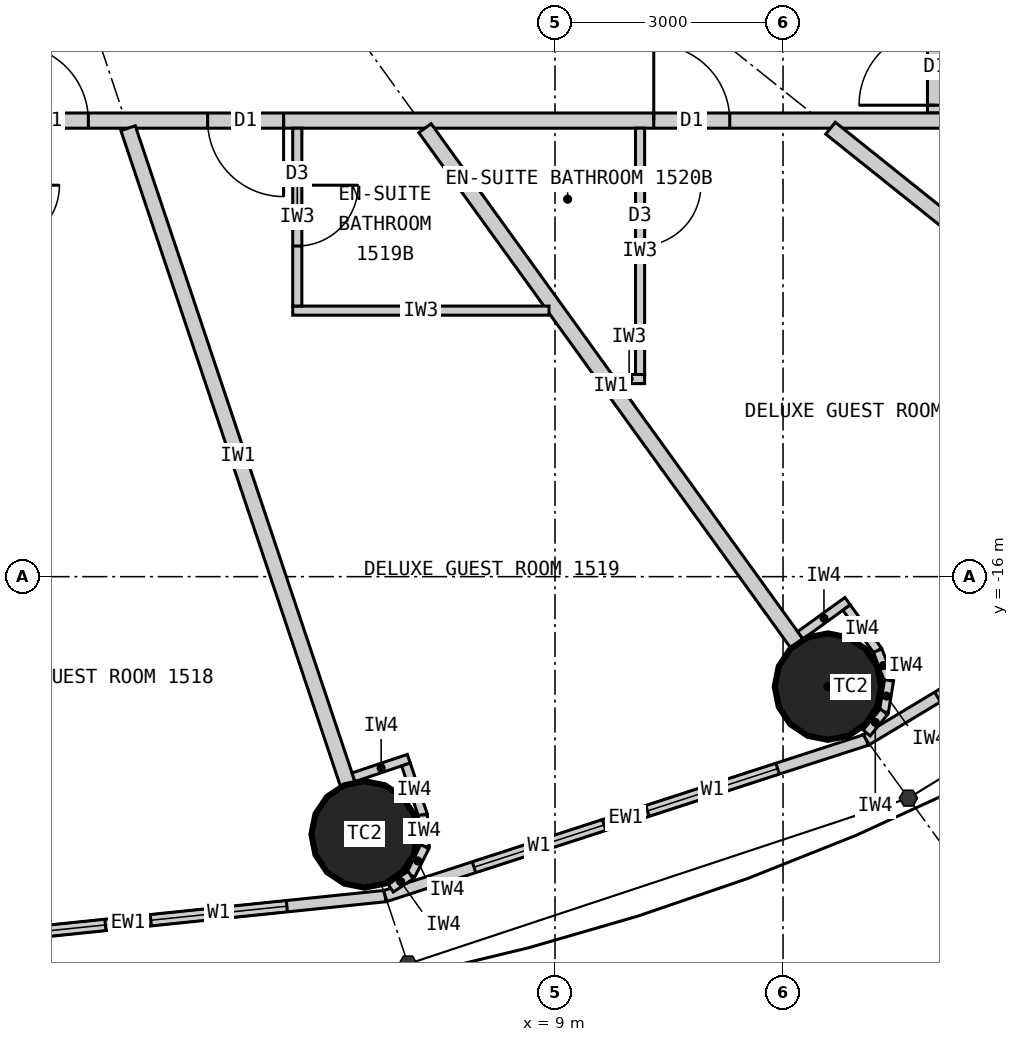
"""IFC4 building model, lengths in metres.
Left out: names, types, materials, properties, quantities, classifications, styles, units other than length and angle.
Written with IfcOpenShell. Run it as: python <this file> out.ifc"""

import sys

from ifc_helpers import new_model, si_unit, direction, frame, frame_2d, origin, origin_2d, place, context, subcontext, project, spatial, rectangle, circle, extrude, element, fill, save


model = new_model("IFC4")
c1 = context("Model", 3, precision=1e-05, world=origin(), true_north=direction((0.0, 1.0)))
c2 = subcontext(c1, "Body", "Model", "MODEL_VIEW")
j1 = project(units=[si_unit("LENGTHUNIT", "METRE"), si_unit("PLANEANGLEUNIT", "RADIAN")], contexts=[c1])
p1 = place(None, origin())
s1 = spatial("IfcSite", under=j1, at=p1, CompositionType="ELEMENT")
p2 = place(p1, origin())
s2 = spatial("IfcBuilding", under=s1, at=p2, CompositionType="ELEMENT")
p3 = place(p2, frame((0.0, 0.0, 63.9)))
s3 = spatial("IfcBuildingStorey", under=s2, at=p3, CompositionType="ELEMENT", Elevation=63.9)
for number, where, z_axis, x_axis in (
    (1, (6.495, -19.391, 0.0), (0.0, 0.0, 1.0), (1.0, 0.0, 0.0)),
    (2, (12.591, -17.447, 0.0), (0.0, 0.0, 1.0), (1.0, 0.0, 0.0)),
):
    element("IfcColumn", number, at=place(p3, frame(where, z_axis=z_axis, x_axis=x_axis)), inside=s3, PredefinedType="COLUMN", context=c2, shape_type="SweptSolid", body=[
        extrude(circle(Radius=0.7, at=origin_2d()), origin(), (0.0, 0.0, 1.0), 3.3),
    ])
p4 = place(p3, frame((0.0, -20.9, 0.0), z_axis=(0.0, 0.0, 1.0), x_axis=(0.994721394369, 0.102612609291, 0.0)))
e3 = element("IfcWall", 3, at=p4, inside=s3, PredefinedType="ELEMENTEDWALL", context=c2, shape_type="SweptSolid", body=[
    extrude(rectangle(XDim=6.802, YDim=0.15, at=frame_2d((3.401, 0.0))), origin(), (0.0, 0.0, 1.0), 3.12),
])
p5 = place(p4, frame((1.301, 0.0, 0.9)))
e4 = element("IfcOpeningElement", 4, at=p5, cuts=e3, PredefinedType="OPENING", context=c2, shape_type="SweptSolid", body=[
    extrude(rectangle(XDim=1.8, YDim=1.9, at=frame_2d((0.9, 0.95))), frame((0.0, 0.085, 0.0), z_axis=(0.0, -1.0, 0.0), x_axis=(1.0, 0.0, 0.0)), (0.0, 0.0, 1.0), 0.17),
])
p6 = place(p4, frame((3.701, 0.0, 0.9)))
e5 = element("IfcOpeningElement", 5, at=p6, cuts=e3, PredefinedType="OPENING", context=c2, shape_type="SweptSolid", body=[
    extrude(rectangle(XDim=1.8, YDim=1.9, at=frame_2d((0.9, 0.95))), frame((0.0, 0.085, 0.0), z_axis=(0.0, -1.0, 0.0), x_axis=(1.0, 0.0, 0.0)), (0.0, 0.0, 1.0), 0.17),
])
p7 = place(p3, frame((6.766, -20.202, 0.0), z_axis=(0.0, 0.0, 1.0), x_axis=(0.951137534625, 0.308767534285, 0.0)))
e6 = element("IfcWall", 6, at=p7, inside=s3, PredefinedType="ELEMENTEDWALL", context=c2, shape_type="SweptSolid", body=[
    extrude(rectangle(XDim=6.655, YDim=0.15, at=frame_2d((3.328, 0.0))), origin(), (0.0, 0.0, 1.0), 3.12),
])
p8 = place(p7, frame((1.228, 0.0, 0.9)))
e7 = element("IfcOpeningElement", 7, at=p8, cuts=e6, PredefinedType="OPENING", context=c2, shape_type="SweptSolid", body=[
    extrude(rectangle(XDim=1.8, YDim=1.9, at=frame_2d((0.9, 0.95))), frame((0.0, 0.085, 0.0), z_axis=(0.0, -1.0, 0.0), x_axis=(1.0, 0.0, 0.0)), (0.0, 0.0, 1.0), 0.17),
])
p9 = place(p7, frame((3.628, 0.0, 0.9)))
e8 = element("IfcOpeningElement", 8, at=p9, cuts=e6, PredefinedType="OPENING", context=c2, shape_type="SweptSolid", body=[
    extrude(rectangle(XDim=1.8, YDim=1.9, at=frame_2d((0.9, 0.95))), frame((0.0, 0.085, 0.0), z_axis=(0.0, -1.0, 0.0), x_axis=(1.0, 0.0, 0.0)), (0.0, 0.0, 1.0), 0.17),
])
p10 = place(p3, frame((13.096, -18.147, 0.0), z_axis=(0.0, 0.0, 1.0), x_axis=(0.856983180864, 0.515344377787, 0.0)))
e9 = element("IfcWall", 9, at=p10, inside=s3, PredefinedType="ELEMENTEDWALL", context=c2, shape_type="SweptSolid", body=[
    extrude(rectangle(XDim=6.386, YDim=0.15, at=frame_2d((3.193, 0.0))), origin(), (0.0, 0.0, 1.0), 3.12),
])
p11 = place(p10, frame((1.093, 0.0, 0.9)))
e10 = element("IfcOpeningElement", 10, at=p11, cuts=e9, PredefinedType="OPENING", context=c2, shape_type="SweptSolid", body=[
    extrude(rectangle(XDim=1.8, YDim=1.9, at=frame_2d((0.9, 0.95))), frame((0.0, 0.085, 0.0), z_axis=(0.0, -1.0, 0.0), x_axis=(1.0, 0.0, 0.0)), (0.0, 0.0, 1.0), 0.17),
])
p12 = place(p10, frame((3.493, 0.0, 0.9)))
e11 = element("IfcOpeningElement", 11, at=p12, cuts=e9, PredefinedType="OPENING", context=c2, shape_type="SweptSolid", body=[
    extrude(rectangle(XDim=1.8, YDim=1.9, at=frame_2d((0.9, 0.95))), frame((0.0, 0.085, 0.0), z_axis=(0.0, -1.0, 0.0), x_axis=(1.0, 0.0, 0.0)), (0.0, 0.0, 1.0), 0.17),
])
p13 = place(p3, frame((14.0, -9.9, 0.0), z_axis=(0.0, 0.0, 1.0), x_axis=(0.0, 1.0, 0.0)))
e12 = element("IfcWall", 12, at=p13, inside=s3, PredefinedType="PARTITIONING", context=c2, shape_type="SweptSolid", body=[
    extrude(rectangle(XDim=19.8, YDim=0.2, at=frame_2d((9.9, 0.0))), origin(), (0.0, 0.0, 1.0), 3.12),
])
p14 = place(p13, frame((0.103, 0.0, 0.0)))
e13 = element("IfcOpeningElement", 13, at=p14, cuts=e12, PredefinedType="OPENING", context=c2, shape_type="SweptSolid", body=[
    extrude(rectangle(XDim=1.0, YDim=2.2, at=frame_2d((0.5, 1.1))), frame((0.0, 0.11, 0.0), z_axis=(0.0, -1.0, 0.0), x_axis=(1.0, 0.0, 0.0)), (0.0, 0.0, 1.0), 0.22),
])
p15 = place(p13, frame((5.248, 0.0, 0.0)))
e14 = element("IfcOpeningElement", 14, at=p15, cuts=e12, PredefinedType="OPENING", context=c2, shape_type="SweptSolid", body=[
    extrude(rectangle(XDim=1.0, YDim=2.2, at=frame_2d((0.5, 1.1))), frame((0.0, 0.11, 0.0), z_axis=(0.0, -1.0, 0.0), x_axis=(1.0, 0.0, 0.0)), (0.0, 0.0, 1.0), 0.22),
])
p16 = place(p13, frame((8.438, 0.0, 0.0)))
e15 = element("IfcOpeningElement", 15, at=p16, cuts=e12, PredefinedType="OPENING", context=c2, shape_type="SweptSolid", body=[
    extrude(rectangle(XDim=1.0, YDim=2.2, at=frame_2d((0.5, 1.1))), frame((0.0, 0.11, 0.0), z_axis=(0.0, -1.0, 0.0), x_axis=(1.0, 0.0, 0.0)), (0.0, 0.0, 1.0), 0.22),
])
p17 = place(p13, frame((14.532, 0.0, 0.0)))
e16 = element("IfcOpeningElement", 16, at=p17, cuts=e12, PredefinedType="OPENING", context=c2, shape_type="SweptSolid", body=[
    extrude(rectangle(XDim=1.0, YDim=2.2, at=frame_2d((0.5, 1.1))), frame((0.0, 0.11, 0.0), z_axis=(0.0, -1.0, 0.0), x_axis=(1.0, 0.0, 0.0)), (0.0, 0.0, 1.0), 0.22),
])
p18 = place(p3, frame((14.1, -10.0, 0.0), z_axis=(0.0, 0.0, 1.0), x_axis=(-1.0, 0.0, 0.0)))
e17 = element("IfcWall", 17, at=p18, inside=s3, PredefinedType="PARTITIONING", context=c2, shape_type="SweptSolid", body=[
    extrude(rectangle(XDim=28.2, YDim=0.2, at=frame_2d((14.1, 0.0))), origin(), (0.0, 0.0, 1.0), 3.12),
])
p19 = place(p18, frame((23.865, 0.0, 0.0)))
e18 = element("IfcOpeningElement", 18, at=p19, cuts=e17, PredefinedType="OPENING", context=c2, shape_type="SweptSolid", body=[
    extrude(rectangle(XDim=1.0, YDim=2.2, at=frame_2d((0.5, 1.1))), frame((0.0, 0.11, 0.0), z_axis=(0.0, -1.0, 0.0), x_axis=(1.0, 0.0, 0.0)), (0.0, 0.0, 1.0), 0.22),
])
p20 = place(p18, frame((18.529, 0.0, 0.0)))
e19 = element("IfcOpeningElement", 19, at=p20, cuts=e17, PredefinedType="OPENING", context=c2, shape_type="SweptSolid", body=[
    extrude(rectangle(XDim=1.0, YDim=2.2, at=frame_2d((0.5, 1.1))), frame((0.0, 0.11, 0.0), z_axis=(0.0, -1.0, 0.0), x_axis=(1.0, 0.0, 0.0)), (0.0, 0.0, 1.0), 0.22),
])
p21 = place(p18, frame((14.623, 0.0, 0.0)))
e20 = element("IfcOpeningElement", 20, at=p21, cuts=e17, PredefinedType="OPENING", context=c2, shape_type="SweptSolid", body=[
    extrude(rectangle(XDim=1.0, YDim=2.2, at=frame_2d((0.5, 1.1))), frame((0.0, 0.11, 0.0), z_axis=(0.0, -1.0, 0.0), x_axis=(1.0, 0.0, 0.0)), (0.0, 0.0, 1.0), 0.22),
])
p22 = place(p18, frame((11.24, 0.0, 0.0)))
e21 = element("IfcOpeningElement", 21, at=p22, cuts=e17, PredefinedType="OPENING", context=c2, shape_type="SweptSolid", body=[
    extrude(rectangle(XDim=1.0, YDim=2.2, at=frame_2d((0.5, 1.1))), frame((0.0, 0.11, 0.0), z_axis=(0.0, -1.0, 0.0), x_axis=(1.0, 0.0, 0.0)), (0.0, 0.0, 1.0), 0.22),
])
p23 = place(p18, frame((8.671, 0.0, 0.0)))
e22 = element("IfcOpeningElement", 22, at=p23, cuts=e17, PredefinedType="OPENING", context=c2, shape_type="SweptSolid", body=[
    extrude(rectangle(XDim=1.0, YDim=2.2, at=frame_2d((0.5, 1.1))), frame((0.0, 0.11, 0.0), z_axis=(0.0, -1.0, 0.0), x_axis=(1.0, 0.0, 0.0)), (0.0, 0.0, 1.0), 0.22),
])
p24 = place(p18, frame((2.801, 0.0, 0.0)))
e23 = element("IfcOpeningElement", 23, at=p24, cuts=e17, PredefinedType="OPENING", context=c2, shape_type="SweptSolid", body=[
    extrude(rectangle(XDim=1.0, YDim=2.2, at=frame_2d((0.5, 1.1))), frame((0.0, 0.11, 0.0), z_axis=(0.0, -1.0, 0.0), x_axis=(1.0, 0.0, 0.0)), (0.0, 0.0, 1.0), 0.22),
])
p25 = place(p3, frame((3.383, -10.1, 0.0), z_axis=(0.0, 0.0, 1.0), x_axis=(0.31759592231, -0.948226149256, 0.0)))
e24 = element("IfcWall", 24, at=p25, inside=s3, PredefinedType="PARTITIONING", context=c2, shape_type="SweptSolid", body=[
    extrude(rectangle(XDim=9.098, YDim=0.2, at=frame_2d((4.549, 0.0))), origin(), (0.0, 0.0, 1.0), 2.32),
])
p26 = place(p3, frame((7.289, -10.1, 0.0), z_axis=(0.0, 0.0, 1.0), x_axis=(0.585198353053, -0.810890182197, 0.0)))
e25 = element("IfcWall", 25, at=p26, inside=s3, PredefinedType="PARTITIONING", context=c2, shape_type="SweptSolid", body=[
    extrude(rectangle(XDim=8.36, YDim=0.2, at=frame_2d((4.18, 0.0))), origin(), (0.0, 0.0, 1.0), 2.32),
])
p27 = place(p3, frame((12.625, -10.1, 0.0), z_axis=(0.0, 0.0, 1.0), x_axis=(0.780892451574, -0.624665493744, 0.0)))
e26 = element("IfcWall", 26, at=p27, inside=s3, PredefinedType="PARTITIONING", context=c2, shape_type="SweptSolid", body=[
    extrude(rectangle(XDim=6.045, YDim=0.2, at=frame_2d((3.022, 0.0))), origin(), (0.0, 0.0, 1.0), 2.32),
])
p28 = place(p3, frame((8.921, -12.5, 0.0), z_axis=(0.0, 0.0, 1.0), x_axis=(-1.0, 0.0, 0.0)))
e27 = element("IfcWall", 27, at=p28, inside=s3, PredefinedType="PARTITIONING", context=c2, shape_type="SweptSolid", body=[
    extrude(rectangle(XDim=3.372, YDim=0.12, at=frame_2d((1.686, 0.0))), origin(), (0.0, 0.0, 1.0), 3.12),
])
p29 = place(p3, frame((5.609, -10.1, 0.0), z_axis=(0.0, 0.0, 1.0), x_axis=(0.0, -1.0, 0.0)))
e28 = element("IfcWall", 28, at=p29, inside=s3, PredefinedType="PARTITIONING", context=c2, shape_type="SweptSolid", body=[
    extrude(rectangle(XDim=2.34, YDim=0.12, at=frame_2d((1.17, 0.0))), origin(), (0.0, 0.0, 1.0), 3.12),
])
p30 = place(p29, frame((0.75, 0.0, 0.0)))
e29 = element("IfcOpeningElement", 29, at=p30, cuts=e28, PredefinedType="OPENING", context=c2, shape_type="SweptSolid", body=[
    extrude(rectangle(XDim=0.8, YDim=2.1, at=frame_2d((0.4, 1.05))), frame((0.0, 0.07, 0.0), z_axis=(0.0, -1.0, 0.0), x_axis=(1.0, 0.0, 0.0)), (0.0, 0.0, 1.0), 0.14),
])
p31 = place(p3, frame((9.771, -13.4, 0.0), z_axis=(0.0, 0.0, 1.0), x_axis=(1.0, 0.0, 0.0)))
e30 = element("IfcWall", 30, at=p31, inside=s3, PredefinedType="PARTITIONING", context=c2, shape_type="SweptSolid", body=[
    extrude(rectangle(XDim=0.408, YDim=0.12, at=frame_2d((0.204, 0.0))), origin(), (0.0, 0.0, 1.0), 3.12),
])
p32 = place(p3, frame((10.119, -10.1, 0.0), z_axis=(0.0, 0.0, 1.0), x_axis=(0.0, -1.0, 0.0)))
e31 = element("IfcWall", 31, at=p32, inside=s3, PredefinedType="PARTITIONING", context=c2, shape_type="SweptSolid", body=[
    extrude(rectangle(XDim=3.24, YDim=0.12, at=frame_2d((1.62, 0.0))), origin(), (0.0, 0.0, 1.0), 3.12),
])
p33 = place(p32, frame((0.75, 0.0, 0.0)))
e32 = element("IfcOpeningElement", 32, at=p33, cuts=e31, PredefinedType="OPENING", context=c2, shape_type="SweptSolid", body=[
    extrude(rectangle(XDim=0.8, YDim=2.1, at=frame_2d((0.4, 1.05))), frame((0.0, 0.07, 0.0), z_axis=(0.0, -1.0, 0.0), x_axis=(1.0, 0.0, 0.0)), (0.0, 0.0, 1.0), 0.14),
])
p34 = place(p3, frame((6.348, -18.639, 0.0), z_axis=(0.0, 0.0, 1.0), x_axis=(0.948268951266, 0.317468102437, 0.0)))
e33 = element("IfcWall", 33, at=p34, inside=s3, PredefinedType="PARTITIONING", context=c2, shape_type="SweptSolid", body=[
    extrude(rectangle(XDim=0.768, YDim=0.12, at=frame_2d((0.384, 0.0))), origin(), (0.0, 0.0, 1.0), 3.12),
])
p35 = place(p3, frame((7.038, -18.471, 0.0), z_axis=(0.0, 0.0, 1.0), x_axis=(0.317378466199, -0.9482989556, 0.0)))
e34 = element("IfcWall", 34, at=p35, inside=s3, PredefinedType="PARTITIONING", context=c2, shape_type="SweptSolid", body=[
    extrude(rectangle(XDim=0.7, YDim=0.12, at=frame_2d((0.35, 0.0))), origin(), (0.0, 0.0, 1.0), 3.12),
])
p36 = place(p3, frame((7.26, -19.135, 0.0), z_axis=(0.0, 0.0, 1.0), x_axis=(0.0613238046, -0.99811792439, 0.0)))
e35 = element("IfcWall", 35, at=p36, inside=s3, PredefinedType="PARTITIONING", context=c2, shape_type="SweptSolid", body=[
    extrude(rectangle(XDim=0.418, YDim=0.12, at=frame_2d((0.209, 0.0))), origin(), (0.0, 0.0, 1.0), 3.12),
])
p37 = place(p3, frame((7.286, -19.552, 0.0), z_axis=(0.0, 0.0, 1.0), x_axis=(-0.445810757773, -0.89512723579, 0.0)))
e36 = element("IfcWall", 36, at=p37, inside=s3, PredefinedType="PARTITIONING", context=c2, shape_type="SweptSolid", body=[
    extrude(rectangle(XDim=0.418, YDim=0.12, at=frame_2d((0.209, 0.0))), origin(), (0.0, 0.0, 1.0), 3.12),
])
p38 = place(p3, frame((7.1, -19.926, 0.0), z_axis=(0.0, 0.0, 1.0), x_axis=(-0.833488262509, -0.552537162787, 0.0)))
e37 = element("IfcWall", 37, at=p38, inside=s3, PredefinedType="PARTITIONING", context=c2, shape_type="SweptSolid", body=[
    extrude(rectangle(XDim=0.313, YDim=0.12, at=frame_2d((0.156, 0.0))), origin(), (0.0, 0.0, 1.0), 3.12),
])
p39 = place(p3, frame((12.227, -16.772, 0.0), z_axis=(0.0, 0.0, 1.0), x_axis=(0.810821798253, 0.585293098778, 0.0)))
e38 = element("IfcWall", 38, at=p39, inside=s3, PredefinedType="PARTITIONING", context=c2, shape_type="SweptSolid", body=[
    extrude(rectangle(XDim=0.768, YDim=0.12, at=frame_2d((0.384, 0.0))), origin(), (0.0, 0.0, 1.0), 3.12),
])
p40 = place(p3, frame((12.836, -16.406, 0.0), z_axis=(0.0, 0.0, 1.0), x_axis=(0.585223113993, -0.810872312296, 0.0)))
e39 = element("IfcWall", 39, at=p40, inside=s3, PredefinedType="PARTITIONING", context=c2, shape_type="SweptSolid", body=[
    extrude(rectangle(XDim=0.7, YDim=0.12, at=frame_2d((0.35, 0.0))), origin(), (0.0, 0.0, 1.0), 3.12),
])
p41 = place(p3, frame((13.246, -16.974, 0.0), z_axis=(0.0, 0.0, 1.0), x_axis=(0.355728122235, -0.934589483705, 0.0)))
e40 = element("IfcWall", 40, at=p41, inside=s3, PredefinedType="PARTITIONING", context=c2, shape_type="SweptSolid", body=[
    extrude(rectangle(XDim=0.418, YDim=0.12, at=frame_2d((0.209, 0.0))), origin(), (0.0, 0.0, 1.0), 3.12),
])
p42 = place(p3, frame((13.394, -17.365, 0.0), z_axis=(0.0, 0.0, 1.0), x_axis=(-0.159379276926, -0.987217425943, 0.0)))
e41 = element("IfcWall", 41, at=p42, inside=s3, PredefinedType="PARTITIONING", context=c2, shape_type="SweptSolid", body=[
    extrude(rectangle(XDim=0.418, YDim=0.12, at=frame_2d((0.209, 0.0))), origin(), (0.0, 0.0, 1.0), 3.12),
])
p43 = place(p3, frame((13.328, -17.777, 0.0), z_axis=(0.0, 0.0, 1.0), x_axis=(-0.632276783541, -0.774742582407, 0.0)))
e42 = element("IfcWall", 42, at=p43, inside=s3, PredefinedType="PARTITIONING", context=c2, shape_type="SweptSolid", body=[
    extrude(rectangle(XDim=0.36, YDim=0.12, at=frame_2d((0.18, 0.0))), origin(), (0.0, 0.0, 1.0), 3.12),
])
p44 = place(p5, origin())
e43 = element("IfcWindow", 43, at=p44, inside=s3, PartitioningType="SINGLE_PANEL", PredefinedType="WINDOW", context=c2, shape_type="SweptSolid", body=[
    extrude(rectangle(XDim=1.8, YDim=1.9, at=frame_2d((0.9, 0.95))), frame((0.0, 0.03, 0.0), z_axis=(0.0, -1.0, 0.0), x_axis=(1.0, 0.0, 0.0)), (0.0, 0.0, 1.0), 0.06),
])
fill(e4, e43)
p45 = place(p6, origin())
e44 = element("IfcWindow", 44, at=p45, inside=s3, PartitioningType="SINGLE_PANEL", PredefinedType="WINDOW", context=c2, shape_type="SweptSolid", body=[
    extrude(rectangle(XDim=1.8, YDim=1.9, at=frame_2d((0.9, 0.95))), frame((0.0, 0.03, 0.0), z_axis=(0.0, -1.0, 0.0), x_axis=(1.0, 0.0, 0.0)), (0.0, 0.0, 1.0), 0.06),
])
fill(e5, e44)
p46 = place(p8, origin())
e45 = element("IfcWindow", 45, at=p46, inside=s3, PartitioningType="SINGLE_PANEL", PredefinedType="WINDOW", context=c2, shape_type="SweptSolid", body=[
    extrude(rectangle(XDim=1.8, YDim=1.9, at=frame_2d((0.9, 0.95))), frame((0.0, 0.03, 0.0), z_axis=(0.0, -1.0, 0.0), x_axis=(1.0, 0.0, 0.0)), (0.0, 0.0, 1.0), 0.06),
])
fill(e7, e45)
p47 = place(p9, origin())
e46 = element("IfcWindow", 46, at=p47, inside=s3, PartitioningType="SINGLE_PANEL", PredefinedType="WINDOW", context=c2, shape_type="SweptSolid", body=[
    extrude(rectangle(XDim=1.8, YDim=1.9, at=frame_2d((0.9, 0.95))), frame((0.0, 0.03, 0.0), z_axis=(0.0, -1.0, 0.0), x_axis=(1.0, 0.0, 0.0)), (0.0, 0.0, 1.0), 0.06),
])
fill(e8, e46)
p48 = place(p11, origin())
e47 = element("IfcWindow", 47, at=p48, inside=s3, PartitioningType="SINGLE_PANEL", PredefinedType="WINDOW", context=c2, shape_type="SweptSolid", body=[
    extrude(rectangle(XDim=1.8, YDim=1.9, at=frame_2d((0.9, 0.95))), frame((0.0, 0.03, 0.0), z_axis=(0.0, -1.0, 0.0), x_axis=(1.0, 0.0, 0.0)), (0.0, 0.0, 1.0), 0.06),
])
fill(e10, e47)
p49 = place(p14, origin())
e48 = element("IfcDoor", 48, at=p49, inside=s3, OperationType="SINGLE_SWING_LEFT", PredefinedType="DOOR", context=c2, shape_type="SweptSolid", body=[
    extrude(rectangle(XDim=1.0, YDim=2.2, at=frame_2d((0.5, 1.1))), frame((0.0, 0.025, 0.0), z_axis=(0.0, -1.0, 0.0), x_axis=(1.0, 0.0, 0.0)), (0.0, 0.0, 1.0), 0.05),
])
fill(e13, e48)
p50 = place(p22, origin())
e49 = element("IfcDoor", 49, at=p50, inside=s3, OperationType="SINGLE_SWING_RIGHT", PredefinedType="DOOR", context=c2, shape_type="SweptSolid", body=[
    extrude(rectangle(XDim=1.0, YDim=2.2, at=frame_2d((0.5, 1.1))), frame((0.0, 0.025, 0.0), z_axis=(0.0, -1.0, 0.0), x_axis=(1.0, 0.0, 0.0)), (0.0, 0.0, 1.0), 0.05),
])
fill(e21, e49)
p51 = place(p30, origin())
e50 = element("IfcDoor", 50, at=p51, inside=s3, OperationType="SINGLE_SWING_LEFT", PredefinedType="DOOR", context=c2, shape_type="SweptSolid", body=[
    extrude(rectangle(XDim=0.8, YDim=2.1, at=frame_2d((0.4, 1.05))), frame((0.0, 0.025, 0.0), z_axis=(0.0, -1.0, 0.0), x_axis=(1.0, 0.0, 0.0)), (0.0, 0.0, 1.0), 0.05),
])
fill(e29, e50)
p52 = place(p23, origin())
e51 = element("IfcDoor", 51, at=p52, inside=s3, OperationType="SINGLE_SWING_LEFT", PredefinedType="DOOR", context=c2, shape_type="SweptSolid", body=[
    extrude(rectangle(XDim=1.0, YDim=2.2, at=frame_2d((0.5, 1.1))), frame((0.0, 0.025, 0.0), z_axis=(0.0, -1.0, 0.0), x_axis=(1.0, 0.0, 0.0)), (0.0, 0.0, 1.0), 0.05),
])
fill(e22, e51)
p53 = place(p33, origin())
e52 = element("IfcDoor", 52, at=p53, inside=s3, OperationType="SINGLE_SWING_LEFT", PredefinedType="DOOR", context=c2, shape_type="SweptSolid", body=[
    extrude(rectangle(XDim=0.8, YDim=2.1, at=frame_2d((0.4, 1.05))), frame((0.0, 0.025, 0.0), z_axis=(0.0, -1.0, 0.0), x_axis=(1.0, 0.0, 0.0)), (0.0, 0.0, 1.0), 0.05),
])
fill(e32, e52)
p54 = place(p24, origin())
e53 = element("IfcDoor", 53, at=p54, inside=s3, OperationType="SINGLE_SWING_RIGHT", PredefinedType="DOOR", context=c2, shape_type="SweptSolid", body=[
    extrude(rectangle(XDim=1.0, YDim=2.2, at=frame_2d((0.5, 1.1))), frame((0.0, 0.025, 0.0), z_axis=(0.0, -1.0, 0.0), x_axis=(1.0, 0.0, 0.0)), (0.0, 0.0, 1.0), 0.05),
])
fill(e23, e53)
save(model, sys.argv[1])
